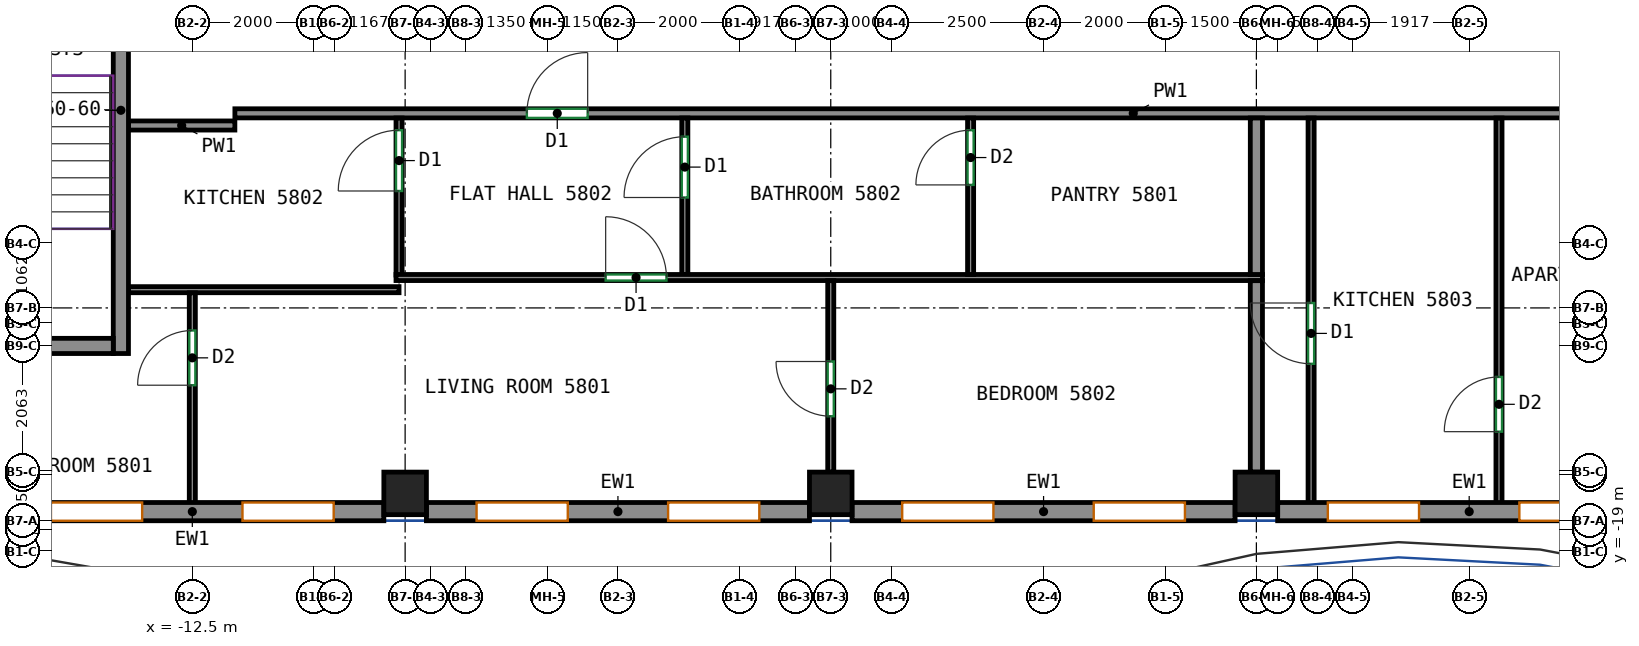
"""IFC4 building model, lengths in metres.
Left out: names, types, materials, properties, quantities, classifications, styles, units other than length and angle.
Written with IfcOpenShell. Run it as: python <this file> out.ifc"""

import sys

from ifc_helpers import new_model, si_unit, direction, frame, frame_2d, origin, origin_2d, place, context, subcontext, project, spatial, rectangle, extrude, source, transform, mapped, element, fill, save


model = new_model("IFC4")
c1 = context("Model", 3, precision=1e-05, world=origin(), true_north=direction((0.0, 1.0)))
c2 = subcontext(c1, "Body", "Model", "MODEL_VIEW")
j1 = project(units=[si_unit("LENGTHUNIT", "METRE"), si_unit("PLANEANGLEUNIT", "RADIAN")], contexts=[c1])
p1 = place(None, origin())
s1 = spatial("IfcSite", under=j1, at=p1, CompositionType="ELEMENT")
p2 = place(p1, origin())
s2 = spatial("IfcBuilding", under=s1, at=p2, CompositionType="ELEMENT")
p3 = place(p2, frame((0.0, 0.0, 242.4)))
s3 = spatial("IfcBuildingStorey", under=s2, at=p3, CompositionType="ELEMENT", Elevation=242.4)
m1 = source(origin(), c2, "Body", "SweptSolid", [
    extrude(rectangle(XDim=0.7, YDim=0.7, at=origin_2d()), origin(), (0.0, 0.0, 1.0), 3.12),
])
for number, where, z_axis, x_axis in (
    (1, (-9.0, -18.05, 0.0), (0.0, 0.0, 1.0), (1.0, 0.0, 0.0)),
    (2, (-2.0, -18.05, 0.0), (0.0, 0.0, 1.0), (1.0, 0.0, 0.0)),
    (3, (5.0, -18.05, 0.0), (0.0, 0.0, 1.0), (1.0, 0.0, 0.0)),
):
    element("IfcColumn", number, at=place(p3, frame(where, z_axis=z_axis, x_axis=x_axis)), inside=s3, PredefinedType="COLUMN", context=c2, shape_type="MappedRepresentation", body=[
        mapped(m1, transform((0.0, 0.0, 0.0))),
    ])
m2 = source(origin(), c2, "Body", "SweptSolid", [
    extrude(rectangle(XDim=8.0, YDim=0.25, at=frame_2d((4.0, 0.0))), origin(), (0.0, 0.0, 1.0), 3.12),
])
p4 = place(p3, frame((-13.675, -15.75, 0.0), z_axis=(0.0, 0.0, 1.0), x_axis=(0.0, 1.0, 0.0)))
e4 = element("IfcWall", 4, at=p4, inside=s3, PredefinedType="SHEAR", context=c2, shape_type="MappedRepresentation", body=[
    mapped(m2, transform((0.0, 0.0, 0.0))),
])
m3 = source(origin(), c2, "Body", "SweptSolid", [
    extrude(rectangle(XDim=3.7, YDim=0.25, at=frame_2d((1.85, 0.0))), origin(), (0.0, 0.0, 1.0), 3.12),
])
p5 = place(p3, frame((-17.5, -15.625, 0.0), z_axis=(0.0, 0.0, 1.0), x_axis=(1.0, 0.0, 0.0)))
e5 = element("IfcWall", 5, at=p5, inside=s3, PredefinedType="SHEAR", context=c2, shape_type="MappedRepresentation", body=[
    mapped(m3, transform((0.0, 0.0, 0.0))),
])
p6 = place(p5, frame((1.25, 0.0, 0.0)))
e6 = element("IfcOpeningElement", 6, at=p6, cuts=e5, PredefinedType="OPENING", context=c2, shape_type="SweptSolid", body=[
    extrude(rectangle(XDim=1.2, YDim=2.1, at=frame_2d((0.6, 1.05))), frame((0.0, 0.135, 0.0), z_axis=(0.0, -1.0, 0.0), x_axis=(1.0, 0.0, 0.0)), (0.0, 0.0, 1.0), 0.27),
])
m4 = source(origin(), c2, "Body", "SweptSolid", [
    extrude(rectangle(XDim=6.3, YDim=0.3, at=frame_2d((3.15, 0.0))), origin(), (0.0, 0.0, 1.0), 3.12),
])
p7 = place(p3, frame((-15.65, -18.35, 0.0), z_axis=(0.0, 0.0, 1.0), x_axis=(1.0, 0.0, 0.0)))
e7 = element("IfcWall", 7, at=p7, inside=s3, PredefinedType="SOLIDWALL", context=c2, shape_type="MappedRepresentation", body=[
    mapped(m4, transform((0.0, 0.0, 0.0))),
])
p8 = place(p7, frame((0.825, 0.0, 0.8)))
e8 = element("IfcOpeningElement", 8, at=p8, cuts=e7, PredefinedType="OPENING", context=c2, shape_type="SweptSolid", body=[
    extrude(rectangle(XDim=1.5, YDim=2.05, at=frame_2d((0.75, 1.025))), frame((0.0, 0.16, 0.0), z_axis=(0.0, -1.0, 0.0), x_axis=(1.0, 0.0, 0.0)), (0.0, 0.0, 1.0), 0.32),
])
p9 = place(p7, frame((3.975, 0.0, 0.8)))
e9 = element("IfcOpeningElement", 9, at=p9, cuts=e7, PredefinedType="OPENING", context=c2, shape_type="SweptSolid", body=[
    extrude(rectangle(XDim=1.5, YDim=2.05, at=frame_2d((0.75, 1.025))), frame((0.0, 0.16, 0.0), z_axis=(0.0, -1.0, 0.0), x_axis=(1.0, 0.0, 0.0)), (0.0, 0.0, 1.0), 0.32),
])
p10 = place(p3, frame((-8.65, -18.35, 0.0), z_axis=(0.0, 0.0, 1.0), x_axis=(1.0, 0.0, 0.0)))
e10 = element("IfcWall", 10, at=p10, inside=s3, PredefinedType="SOLIDWALL", context=c2, shape_type="MappedRepresentation", body=[
    mapped(m4, transform((0.0, 0.0, 0.0))),
])
p11 = place(p10, frame((0.825, 0.0, 0.8)))
e11 = element("IfcOpeningElement", 11, at=p11, cuts=e10, PredefinedType="OPENING", context=c2, shape_type="SweptSolid", body=[
    extrude(rectangle(XDim=1.5, YDim=2.05, at=frame_2d((0.75, 1.025))), frame((0.0, 0.16, 0.0), z_axis=(0.0, -1.0, 0.0), x_axis=(1.0, 0.0, 0.0)), (0.0, 0.0, 1.0), 0.32),
])
p12 = place(p10, frame((3.975, 0.0, 0.8)))
e12 = element("IfcOpeningElement", 12, at=p12, cuts=e10, PredefinedType="OPENING", context=c2, shape_type="SweptSolid", body=[
    extrude(rectangle(XDim=1.5, YDim=2.05, at=frame_2d((0.75, 1.025))), frame((0.0, 0.16, 0.0), z_axis=(0.0, -1.0, 0.0), x_axis=(1.0, 0.0, 0.0)), (0.0, 0.0, 1.0), 0.32),
])
p13 = place(p3, frame((-1.65, -18.35, 0.0), z_axis=(0.0, 0.0, 1.0), x_axis=(1.0, 0.0, 0.0)))
e13 = element("IfcWall", 13, at=p13, inside=s3, PredefinedType="SOLIDWALL", context=c2, shape_type="MappedRepresentation", body=[
    mapped(m4, transform((0.0, 0.0, 0.0))),
])
p14 = place(p13, frame((0.825, 0.0, 0.8)))
e14 = element("IfcOpeningElement", 14, at=p14, cuts=e13, PredefinedType="OPENING", context=c2, shape_type="SweptSolid", body=[
    extrude(rectangle(XDim=1.5, YDim=2.05, at=frame_2d((0.75, 1.025))), frame((0.0, 0.16, 0.0), z_axis=(0.0, -1.0, 0.0), x_axis=(1.0, 0.0, 0.0)), (0.0, 0.0, 1.0), 0.32),
])
p15 = place(p13, frame((3.975, 0.0, 0.8)))
e15 = element("IfcOpeningElement", 15, at=p15, cuts=e13, PredefinedType="OPENING", context=c2, shape_type="SweptSolid", body=[
    extrude(rectangle(XDim=1.5, YDim=2.05, at=frame_2d((0.75, 1.025))), frame((0.0, 0.16, 0.0), z_axis=(0.0, -1.0, 0.0), x_axis=(1.0, 0.0, 0.0)), (0.0, 0.0, 1.0), 0.32),
])
p16 = place(p3, frame((5.35, -18.35, 0.0), z_axis=(0.0, 0.0, 1.0), x_axis=(1.0, 0.0, 0.0)))
e16 = element("IfcWall", 16, at=p16, inside=s3, PredefinedType="SOLIDWALL", context=c2, shape_type="MappedRepresentation", body=[
    mapped(m4, transform((0.0, 0.0, 0.0))),
])
p17 = place(p16, frame((0.825, 0.0, 0.8)))
e17 = element("IfcOpeningElement", 17, at=p17, cuts=e16, PredefinedType="OPENING", context=c2, shape_type="SweptSolid", body=[
    extrude(rectangle(XDim=1.5, YDim=2.05, at=frame_2d((0.75, 1.025))), frame((0.0, 0.16, 0.0), z_axis=(0.0, -1.0, 0.0), x_axis=(1.0, 0.0, 0.0)), (0.0, 0.0, 1.0), 0.32),
])
p18 = place(p16, frame((3.975, 0.0, 0.8)))
e18 = element("IfcOpeningElement", 18, at=p18, cuts=e16, PredefinedType="OPENING", context=c2, shape_type="SweptSolid", body=[
    extrude(rectangle(XDim=1.5, YDim=2.05, at=frame_2d((0.75, 1.025))), frame((0.0, 0.16, 0.0), z_axis=(0.0, -1.0, 0.0), x_axis=(1.0, 0.0, 0.0)), (0.0, 0.0, 1.0), 0.32),
])
p19 = place(p3, frame((-11.8, -11.8, 0.0), z_axis=(0.0, 0.0, 1.0), x_axis=(1.0, 0.0, 0.0)))
e19 = element("IfcWall", 19, at=p19, inside=s3, PredefinedType="PARTITIONING", context=c2, shape_type="SweptSolid", body=[
    extrude(rectangle(XDim=29.55, YDim=0.15, at=frame_2d((14.775, 0.0))), origin(), (0.0, 0.0, 1.0), 3.12),
])
p20 = place(p19, frame((4.802, 0.0, 0.0)))
e20 = element("IfcOpeningElement", 20, at=p20, cuts=e19, PredefinedType="OPENING", context=c2, shape_type="SweptSolid", body=[
    extrude(rectangle(XDim=1.0, YDim=2.1, at=frame_2d((0.5, 1.05))), frame((0.0, 0.085, 0.0), z_axis=(0.0, -1.0, 0.0), x_axis=(1.0, 0.0, 0.0)), (0.0, 0.0, 1.0), 0.17),
])
p21 = place(p19, frame((23.314, 0.0, 0.0)))
e21 = element("IfcOpeningElement", 21, at=p21, cuts=e19, PredefinedType="OPENING", context=c2, shape_type="SweptSolid", body=[
    extrude(rectangle(XDim=1.0, YDim=2.1, at=frame_2d((0.5, 1.05))), frame((0.0, 0.085, 0.0), z_axis=(0.0, -1.0, 0.0), x_axis=(1.0, 0.0, 0.0)), (0.0, 0.0, 1.0), 0.17),
])
p22 = place(p3, frame((-13.55, -12.0, 0.0), z_axis=(0.0, 0.0, 1.0), x_axis=(1.0, 0.0, 0.0)))
e22 = element("IfcWall", 22, at=p22, inside=s3, PredefinedType="PARTITIONING", context=c2, shape_type="SweptSolid", body=[
    extrude(rectangle(XDim=1.75, YDim=0.15, at=frame_2d((0.875, 0.0))), origin(), (0.0, 0.0, 1.0), 3.12),
])
p23 = place(p3, frame((-9.1, -14.46, 0.0), z_axis=(0.0, 0.0, 1.0), x_axis=(0.0, 1.0, 0.0)))
e23 = element("IfcWall", 23, at=p23, inside=s3, PredefinedType="PARTITIONING", context=c2, shape_type="SweptSolid", body=[
    extrude(rectangle(XDim=2.583, YDim=0.1, at=frame_2d((1.292, 0.0))), origin(), (0.0, 0.0, 1.0), 3.12),
])
p24 = place(p23, frame((1.383, 0.0, 0.0)))
e24 = element("IfcOpeningElement", 24, at=p24, cuts=e23, PredefinedType="OPENING", context=c2, shape_type="SweptSolid", body=[
    extrude(rectangle(XDim=1.0, YDim=2.1, at=frame_2d((0.5, 1.05))), frame((0.0, 0.06, 0.0), z_axis=(0.0, -1.0, 0.0), x_axis=(1.0, 0.0, 0.0)), (0.0, 0.0, 1.0), 0.12),
])
p25 = place(p3, frame((-13.55, -14.7, 0.0), z_axis=(0.0, 0.0, 1.0), x_axis=(1.0, 0.0, 0.0)))
e25 = element("IfcWall", 25, at=p25, inside=s3, PredefinedType="PARTITIONING", context=c2, shape_type="SweptSolid", body=[
    extrude(rectangle(XDim=4.45, YDim=0.1, at=frame_2d((2.225, 0.0))), origin(), (0.0, 0.0, 1.0), 3.12),
])
p26 = place(p3, frame((-4.4, -14.45, 0.0), z_axis=(0.0, 0.0, 1.0), x_axis=(0.0, 1.0, 0.0)))
e26 = element("IfcWall", 26, at=p26, inside=s3, PredefinedType="PARTITIONING", context=c2, shape_type="SweptSolid", body=[
    extrude(rectangle(XDim=2.573, YDim=0.1, at=frame_2d((1.287, 0.0))), origin(), (0.0, 0.0, 1.0), 3.12),
])
p27 = place(p26, frame((1.266, 0.0, 0.0)))
e27 = element("IfcOpeningElement", 27, at=p27, cuts=e26, PredefinedType="OPENING", context=c2, shape_type="SweptSolid", body=[
    extrude(rectangle(XDim=1.0, YDim=2.1, at=frame_2d((0.5, 1.05))), frame((0.0, 0.06, 0.0), z_axis=(0.0, -1.0, 0.0), x_axis=(1.0, 0.0, 0.0)), (0.0, 0.0, 1.0), 0.12),
])
p28 = place(p3, frame((-9.15, -14.5, 0.0), z_axis=(0.0, 0.0, 1.0), x_axis=(1.0, 0.0, 0.0)))
e28 = element("IfcWall", 28, at=p28, inside=s3, PredefinedType="PARTITIONING", context=c2, shape_type="SweptSolid", body=[
    extrude(rectangle(XDim=14.25, YDim=0.1, at=frame_2d((7.125, 0.0))), origin(), (0.0, 0.0, 1.0), 3.12),
])
p29 = place(p28, frame((3.448, 0.0, 0.0)))
e29 = element("IfcOpeningElement", 29, at=p29, cuts=e28, PredefinedType="OPENING", context=c2, shape_type="SweptSolid", body=[
    extrude(rectangle(XDim=1.0, YDim=2.1, at=frame_2d((0.5, 1.05))), frame((0.0, 0.06, 0.0), z_axis=(0.0, -1.0, 0.0), x_axis=(1.0, 0.0, 0.0)), (0.0, 0.0, 1.0), 0.12),
])
p30 = place(p3, frame((0.3, -14.45, 0.0), z_axis=(0.0, 0.0, 1.0), x_axis=(0.0, 1.0, 0.0)))
e30 = element("IfcWall", 30, at=p30, inside=s3, PredefinedType="PARTITIONING", context=c2, shape_type="SweptSolid", body=[
    extrude(rectangle(XDim=2.573, YDim=0.1, at=frame_2d((1.287, 0.0))), origin(), (0.0, 0.0, 1.0), 3.12),
])
p31 = place(p30, frame((1.473, 0.0, 0.0)))
e31 = element("IfcOpeningElement", 31, at=p31, cuts=e30, PredefinedType="OPENING", context=c2, shape_type="SweptSolid", body=[
    extrude(rectangle(XDim=0.9, YDim=2.1, at=frame_2d((0.45, 1.05))), frame((0.0, 0.06, 0.0), z_axis=(0.0, -1.0, 0.0), x_axis=(1.0, 0.0, 0.0)), (0.0, 0.0, 1.0), 0.12),
])
p32 = place(p3, frame((5.0, -14.45, 0.0), z_axis=(0.0, 0.0, 1.0), x_axis=(0.0, 1.0, 0.0)))
e32 = element("IfcWall", 32, at=p32, inside=s3, PredefinedType="PARTITIONING", context=c2, shape_type="SweptSolid", body=[
    extrude(rectangle(XDim=2.573, YDim=0.2, at=frame_2d((1.287, 0.0))), origin(), (0.0, 0.0, 1.0), 3.12),
])
p33 = place(p3, frame((-12.5, -18.25, 0.0), z_axis=(0.0, 0.0, 1.0), x_axis=(0.0, 1.0, 0.0)))
e33 = element("IfcWall", 33, at=p33, inside=s3, PredefinedType="PARTITIONING", context=c2, shape_type="SweptSolid", body=[
    extrude(rectangle(XDim=3.498, YDim=0.1, at=frame_2d((1.749, 0.0))), origin(), (0.0, 0.0, 1.0), 3.12),
])
p34 = place(p33, frame((1.979, 0.0, 0.0)))
e34 = element("IfcOpeningElement", 34, at=p34, cuts=e33, PredefinedType="OPENING", context=c2, shape_type="SweptSolid", body=[
    extrude(rectangle(XDim=0.9, YDim=2.1, at=frame_2d((0.45, 1.05))), frame((0.0, 0.06, 0.0), z_axis=(0.0, -1.0, 0.0), x_axis=(1.0, 0.0, 0.0)), (0.0, 0.0, 1.0), 0.12),
])
p35 = place(p3, frame((-2.0, -17.7, 0.0), z_axis=(0.0, 0.0, 1.0), x_axis=(0.0, 1.0, 0.0)))
e35 = element("IfcWall", 35, at=p35, inside=s3, PredefinedType="PARTITIONING", context=c2, shape_type="SweptSolid", body=[
    extrude(rectangle(XDim=3.148, YDim=0.1, at=frame_2d((1.574, 0.0))), origin(), (0.0, 0.0, 1.0), 3.12),
])
p36 = place(p35, frame((0.919, 0.0, 0.0)))
e36 = element("IfcOpeningElement", 36, at=p36, cuts=e35, PredefinedType="OPENING", context=c2, shape_type="SweptSolid", body=[
    extrude(rectangle(XDim=0.9, YDim=2.1, at=frame_2d((0.45, 1.05))), frame((0.0, 0.06, 0.0), z_axis=(0.0, -1.0, 0.0), x_axis=(1.0, 0.0, 0.0)), (0.0, 0.0, 1.0), 0.12),
])
p37 = place(p3, frame((5.0, -17.7, 0.0), z_axis=(0.0, 0.0, 1.0), x_axis=(0.0, 1.0, 0.0)))
e37 = element("IfcWall", 37, at=p37, inside=s3, PredefinedType="PARTITIONING", context=c2, shape_type="SweptSolid", body=[
    extrude(rectangle(XDim=3.148, YDim=0.2, at=frame_2d((1.574, 0.0))), origin(), (0.0, 0.0, 1.0), 3.12),
])
p38 = place(p3, frame((5.9, -18.25, 0.0), z_axis=(0.0, 0.0, 1.0), x_axis=(0.0, 1.0, 0.0)))
e38 = element("IfcWall", 38, at=p38, inside=s3, PredefinedType="PARTITIONING", context=c2, shape_type="SweptSolid", body=[
    extrude(rectangle(XDim=6.373, YDim=0.1, at=frame_2d((3.187, 0.0))), origin(), (0.0, 0.0, 1.0), 3.12),
])
p39 = place(p38, frame((2.331, 0.0, 0.0)))
e39 = element("IfcOpeningElement", 39, at=p39, cuts=e38, PredefinedType="OPENING", context=c2, shape_type="SweptSolid", body=[
    extrude(rectangle(XDim=1.0, YDim=2.1, at=frame_2d((0.5, 1.05))), frame((0.0, 0.06, 0.0), z_axis=(0.0, -1.0, 0.0), x_axis=(1.0, 0.0, 0.0)), (0.0, 0.0, 1.0), 0.12),
])
p40 = place(p3, frame((8.99, -18.25, 0.0), z_axis=(0.0, 0.0, 1.0), x_axis=(0.0, 1.0, 0.0)))
e40 = element("IfcWall", 40, at=p40, inside=s3, PredefinedType="PARTITIONING", context=c2, shape_type="SweptSolid", body=[
    extrude(rectangle(XDim=6.373, YDim=0.1, at=frame_2d((3.187, 0.0))), origin(), (0.0, 0.0, 1.0), 3.12),
])
p41 = place(p40, frame((1.215, 0.0, 0.0)))
e41 = element("IfcOpeningElement", 41, at=p41, cuts=e40, PredefinedType="OPENING", context=c2, shape_type="SweptSolid", body=[
    extrude(rectangle(XDim=0.9, YDim=2.1, at=frame_2d((0.45, 1.05))), frame((0.0, 0.06, 0.0), z_axis=(0.0, -1.0, 0.0), x_axis=(1.0, 0.0, 0.0)), (0.0, 0.0, 1.0), 0.12),
])
p42 = place(p8, origin())
e42 = element("IfcWindow", 42, at=p42, inside=s3, PartitioningType="SINGLE_PANEL", PredefinedType="WINDOW", context=c2, shape_type="SweptSolid", body=[
    extrude(rectangle(XDim=1.5, YDim=2.05, at=frame_2d((0.75, 1.025))), frame((0.0, 0.03, 0.0), z_axis=(0.0, -1.0, 0.0), x_axis=(1.0, 0.0, 0.0)), (0.0, 0.0, 1.0), 0.06),
])
fill(e8, e42)
p43 = place(p9, origin())
e43 = element("IfcWindow", 43, at=p43, inside=s3, PartitioningType="SINGLE_PANEL", PredefinedType="WINDOW", context=c2, shape_type="SweptSolid", body=[
    extrude(rectangle(XDim=1.5, YDim=2.05, at=frame_2d((0.75, 1.025))), frame((0.0, 0.03, 0.0), z_axis=(0.0, -1.0, 0.0), x_axis=(1.0, 0.0, 0.0)), (0.0, 0.0, 1.0), 0.06),
])
fill(e9, e43)
p44 = place(p11, origin())
e44 = element("IfcWindow", 44, at=p44, inside=s3, PartitioningType="SINGLE_PANEL", PredefinedType="WINDOW", context=c2, shape_type="SweptSolid", body=[
    extrude(rectangle(XDim=1.5, YDim=2.05, at=frame_2d((0.75, 1.025))), frame((0.0, 0.03, 0.0), z_axis=(0.0, -1.0, 0.0), x_axis=(1.0, 0.0, 0.0)), (0.0, 0.0, 1.0), 0.06),
])
fill(e11, e44)
p45 = place(p12, origin())
e45 = element("IfcWindow", 45, at=p45, inside=s3, PartitioningType="SINGLE_PANEL", PredefinedType="WINDOW", context=c2, shape_type="SweptSolid", body=[
    extrude(rectangle(XDim=1.5, YDim=2.05, at=frame_2d((0.75, 1.025))), frame((0.0, 0.03, 0.0), z_axis=(0.0, -1.0, 0.0), x_axis=(1.0, 0.0, 0.0)), (0.0, 0.0, 1.0), 0.06),
])
fill(e12, e45)
p46 = place(p14, origin())
e46 = element("IfcWindow", 46, at=p46, inside=s3, PartitioningType="SINGLE_PANEL", PredefinedType="WINDOW", context=c2, shape_type="SweptSolid", body=[
    extrude(rectangle(XDim=1.5, YDim=2.05, at=frame_2d((0.75, 1.025))), frame((0.0, 0.03, 0.0), z_axis=(0.0, -1.0, 0.0), x_axis=(1.0, 0.0, 0.0)), (0.0, 0.0, 1.0), 0.06),
])
fill(e14, e46)
p47 = place(p15, origin())
e47 = element("IfcWindow", 47, at=p47, inside=s3, PartitioningType="SINGLE_PANEL", PredefinedType="WINDOW", context=c2, shape_type="SweptSolid", body=[
    extrude(rectangle(XDim=1.5, YDim=2.05, at=frame_2d((0.75, 1.025))), frame((0.0, 0.03, 0.0), z_axis=(0.0, -1.0, 0.0), x_axis=(1.0, 0.0, 0.0)), (0.0, 0.0, 1.0), 0.06),
])
fill(e15, e47)
p48 = place(p17, origin())
e48 = element("IfcWindow", 48, at=p48, inside=s3, PartitioningType="SINGLE_PANEL", PredefinedType="WINDOW", context=c2, shape_type="SweptSolid", body=[
    extrude(rectangle(XDim=1.5, YDim=2.05, at=frame_2d((0.75, 1.025))), frame((0.0, 0.03, 0.0), z_axis=(0.0, -1.0, 0.0), x_axis=(1.0, 0.0, 0.0)), (0.0, 0.0, 1.0), 0.06),
])
fill(e17, e48)
p49 = place(p18, origin())
e49 = element("IfcWindow", 49, at=p49, inside=s3, PartitioningType="SINGLE_PANEL", PredefinedType="WINDOW", context=c2, shape_type="SweptSolid", body=[
    extrude(rectangle(XDim=1.5, YDim=2.05, at=frame_2d((0.75, 1.025))), frame((0.0, 0.03, 0.0), z_axis=(0.0, -1.0, 0.0), x_axis=(1.0, 0.0, 0.0)), (0.0, 0.0, 1.0), 0.06),
])
fill(e18, e49)
p50 = place(p41, origin())
e50 = element("IfcDoor", 50, at=p50, inside=s3, OperationType="SINGLE_SWING_LEFT", PredefinedType="DOOR", context=c2, shape_type="SweptSolid", body=[
    extrude(rectangle(XDim=0.9, YDim=2.1, at=frame_2d((0.45, 1.05))), frame((0.0, 0.025, 0.0), z_axis=(0.0, -1.0, 0.0), x_axis=(1.0, 0.0, 0.0)), (0.0, 0.0, 1.0), 0.05),
])
fill(e41, e50)
p51 = place(p36, origin())
e51 = element("IfcDoor", 51, at=p51, inside=s3, OperationType="SINGLE_SWING_RIGHT", PredefinedType="DOOR", context=c2, shape_type="SweptSolid", body=[
    extrude(rectangle(XDim=0.9, YDim=2.1, at=frame_2d((0.45, 1.05))), frame((0.0, 0.025, 0.0), z_axis=(0.0, -1.0, 0.0), x_axis=(1.0, 0.0, 0.0)), (0.0, 0.0, 1.0), 0.05),
])
fill(e36, e51)
p52 = place(p34, origin())
e52 = element("IfcDoor", 52, at=p52, inside=s3, OperationType="SINGLE_SWING_LEFT", PredefinedType="DOOR", context=c2, shape_type="SweptSolid", body=[
    extrude(rectangle(XDim=0.9, YDim=2.1, at=frame_2d((0.45, 1.05))), frame((0.0, 0.025, 0.0), z_axis=(0.0, -1.0, 0.0), x_axis=(1.0, 0.0, 0.0)), (0.0, 0.0, 1.0), 0.05),
])
fill(e34, e52)
p53 = place(p39, origin())
e53 = element("IfcDoor", 53, at=p53, inside=s3, OperationType="SINGLE_SWING_RIGHT", PredefinedType="DOOR", context=c2, shape_type="SweptSolid", body=[
    extrude(rectangle(XDim=1.0, YDim=2.1, at=frame_2d((0.5, 1.05))), frame((0.0, 0.025, 0.0), z_axis=(0.0, -1.0, 0.0), x_axis=(1.0, 0.0, 0.0)), (0.0, 0.0, 1.0), 0.05),
])
fill(e39, e53)
p54 = place(p29, origin())
e54 = element("IfcDoor", 54, at=p54, inside=s3, OperationType="SINGLE_SWING_LEFT", PredefinedType="DOOR", context=c2, shape_type="SweptSolid", body=[
    extrude(rectangle(XDim=1.0, YDim=2.1, at=frame_2d((0.5, 1.05))), frame((0.0, 0.025, 0.0), z_axis=(0.0, -1.0, 0.0), x_axis=(1.0, 0.0, 0.0)), (0.0, 0.0, 1.0), 0.05),
])
fill(e29, e54)
p55 = place(p27, origin())
e55 = element("IfcDoor", 55, at=p55, inside=s3, OperationType="SINGLE_SWING_LEFT", PredefinedType="DOOR", context=c2, shape_type="SweptSolid", body=[
    extrude(rectangle(XDim=1.0, YDim=2.1, at=frame_2d((0.5, 1.05))), frame((0.0, 0.025, 0.0), z_axis=(0.0, -1.0, 0.0), x_axis=(1.0, 0.0, 0.0)), (0.0, 0.0, 1.0), 0.05),
])
fill(e27, e55)
p56 = place(p24, origin())
e56 = element("IfcDoor", 56, at=p56, inside=s3, OperationType="SINGLE_SWING_LEFT", PredefinedType="DOOR", context=c2, shape_type="SweptSolid", body=[
    extrude(rectangle(XDim=1.0, YDim=2.1, at=frame_2d((0.5, 1.05))), frame((0.0, 0.025, 0.0), z_axis=(0.0, -1.0, 0.0), x_axis=(1.0, 0.0, 0.0)), (0.0, 0.0, 1.0), 0.05),
])
fill(e24, e56)
p57 = place(p31, origin())
e57 = element("IfcDoor", 57, at=p57, inside=s3, OperationType="SINGLE_SWING_LEFT", PredefinedType="DOOR", context=c2, shape_type="SweptSolid", body=[
    extrude(rectangle(XDim=0.9, YDim=2.1, at=frame_2d((0.45, 1.05))), frame((0.0, 0.025, 0.0), z_axis=(0.0, -1.0, 0.0), x_axis=(1.0, 0.0, 0.0)), (0.0, 0.0, 1.0), 0.05),
])
fill(e31, e57)
p58 = place(p20, origin())
e58 = element("IfcDoor", 58, at=p58, inside=s3, OperationType="SINGLE_SWING_RIGHT", PredefinedType="DOOR", context=c2, shape_type="SweptSolid", body=[
    extrude(rectangle(XDim=1.0, YDim=2.1, at=frame_2d((0.5, 1.05))), frame((0.0, 0.025, 0.0), z_axis=(0.0, -1.0, 0.0), x_axis=(1.0, 0.0, 0.0)), (0.0, 0.0, 1.0), 0.05),
])
fill(e20, e58)
save(model, sys.argv[1])
